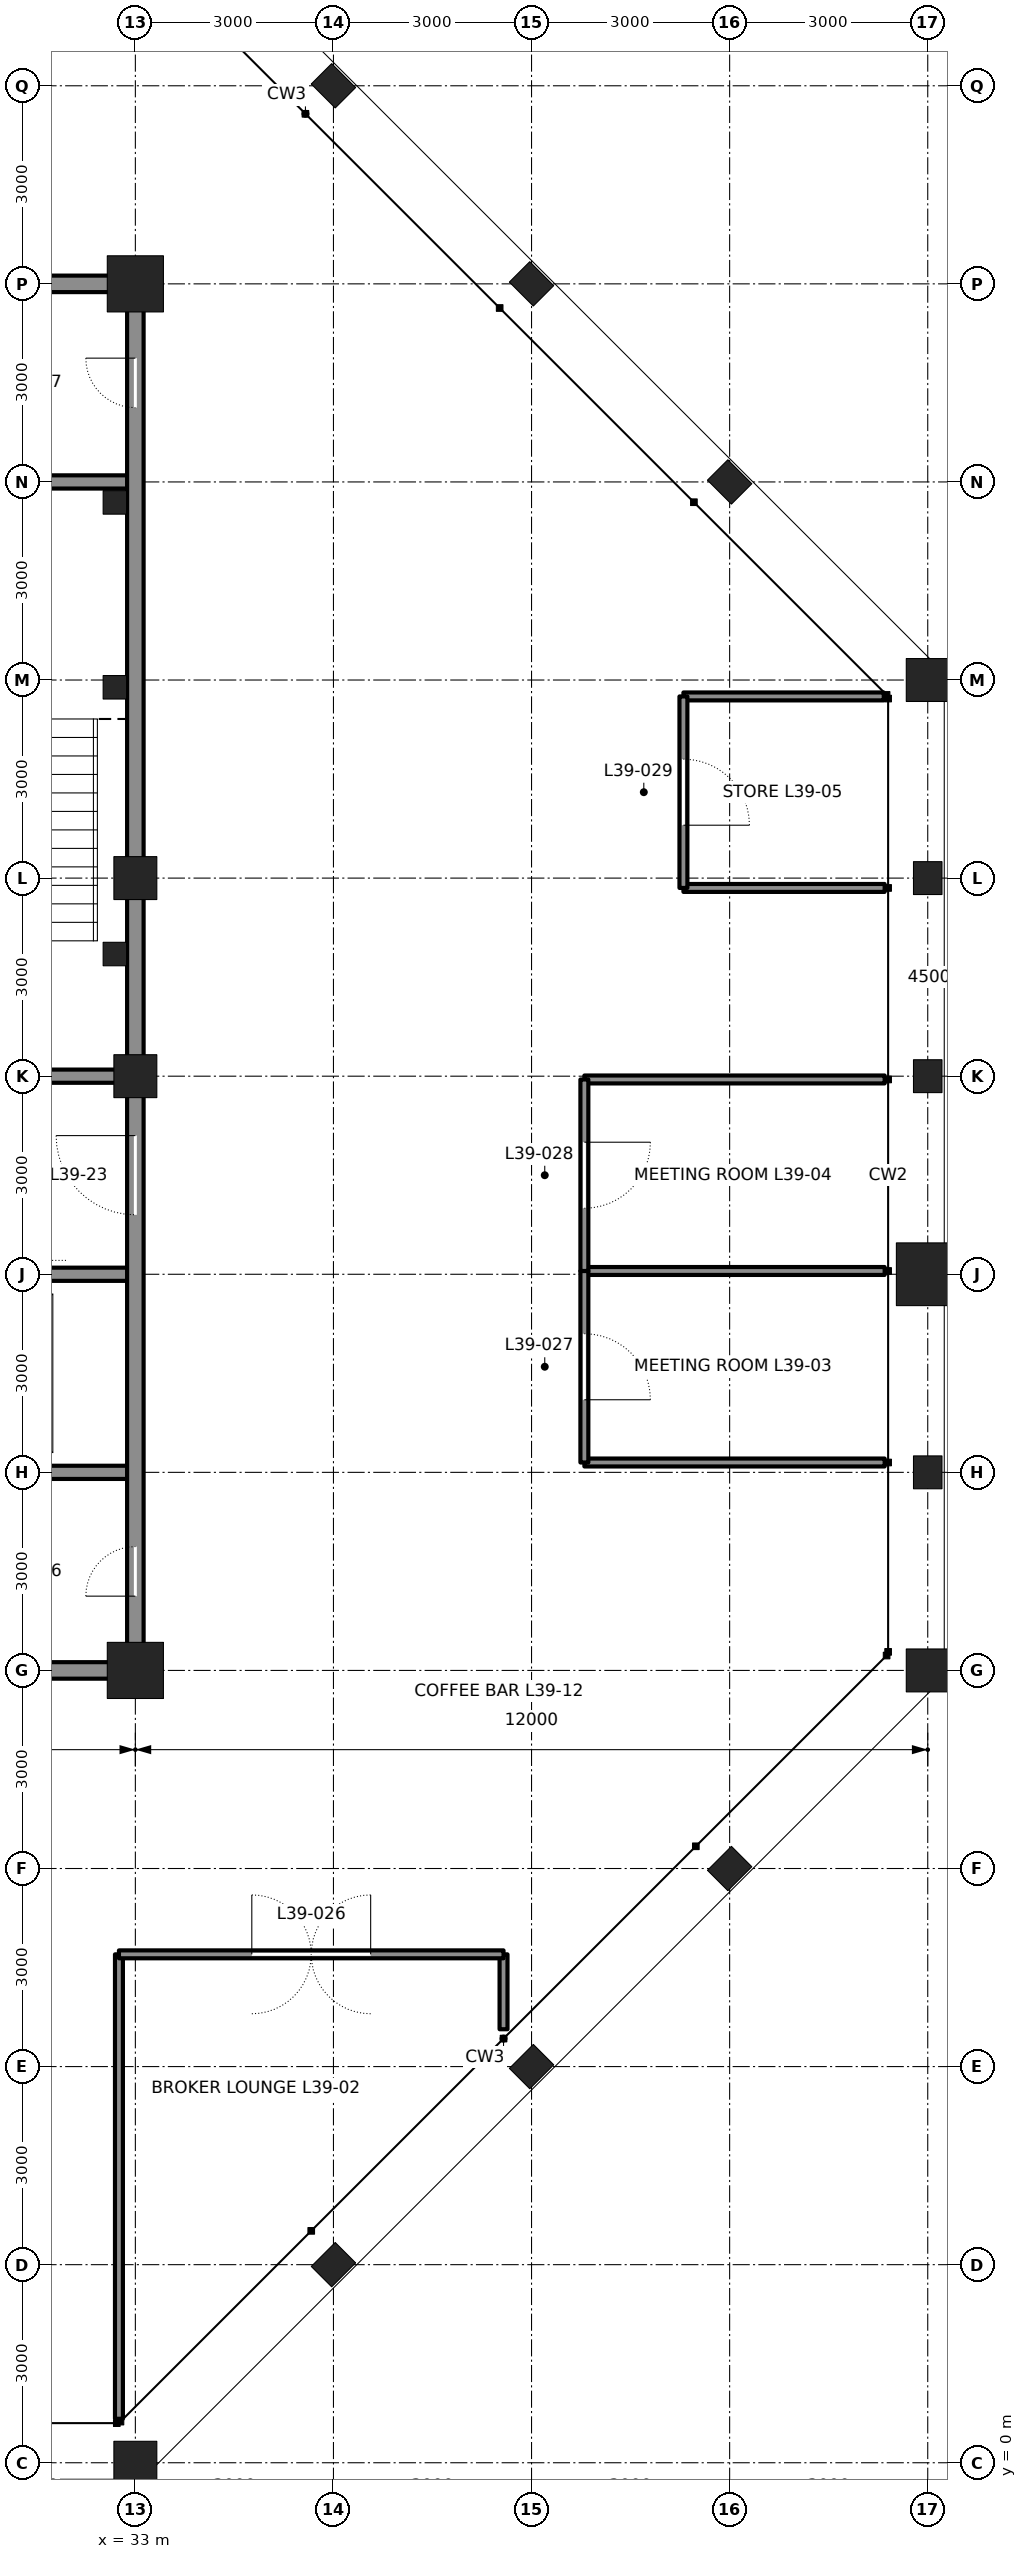
"""IFC4 building model, lengths in metres.
Left out: names, types, materials, properties, quantities, classifications, styles, units other than length and angle.
Written with IfcOpenShell. Run it as: python <this file> out.ifc"""

import sys

from ifc_helpers import new_model, si_unit, direction, frame, frame_2d, origin, origin_2d, place, context, subcontext, project, spatial, rectangle, hollow_rectangle, i_section, extrude, element, fill, save


model = new_model("IFC4")
c1 = context("Model", 3, precision=1e-05, world=origin(), true_north=direction((0.0, 1.0)))
c2 = subcontext(c1, "Body", "Model", "MODEL_VIEW")
j1 = project(units=[si_unit("LENGTHUNIT", "METRE"), si_unit("PLANEANGLEUNIT", "RADIAN")], contexts=[c1])
p1 = place(None, origin())
s1 = spatial("IfcSite", under=j1, at=p1, CompositionType="ELEMENT")
p2 = place(p1, origin())
s2 = spatial("IfcBuilding", under=s1, at=p2, CompositionType="ELEMENT")
p3 = place(p2, frame((0.0, 0.0, 180.0)))
s3 = spatial("IfcBuildingStorey", under=s2, at=p3, CompositionType="ELEMENT", Elevation=180.0)
p4 = place(p3, frame((33.0, 0.0, 0.0), z_axis=(0.0, 0.0, 1.0), x_axis=(0.0, -1.0, 0.0)))
e1 = element("IfcColumn", 1, at=p4, inside=s3, PredefinedType="COLUMN", context=c2, shape_type="SweptSolid", body=[
    extrude(hollow_rectangle(XDim=0.65, YDim=0.65, WallThickness=0.065, at=origin_2d()), origin(), (0.0, 0.0, 1.0), 4.5),
])
for number, where, z_axis, x_axis in (
    (2, (36.0, 3.0, -0.91), (0.0, 0.0, 1.0), (0.707, -0.707, 0.0)),
    (3, (39.0, 6.0, -0.91), (0.0, 0.0, 1.0), (0.707, -0.707, 0.0)),
    (4, (42.0, 9.0, -0.91), (0.0, 0.0, 1.0), (0.707, -0.707, 0.0)),
):
    element("IfcColumn", number, at=place(p3, frame(where, z_axis=z_axis, x_axis=x_axis)), inside=s3, PredefinedType="COLUMN", context=c2, shape_type="SweptSolid", body=[
        extrude(i_section(OverallWidth=0.437, OverallDepth=0.513, WebThickness=0.061, FlangeThickness=0.097, at=origin_2d()), origin(), (0.0, 0.0, 1.0), 5.41),
    ])
p5 = place(p3, frame((45.0, 12.0, 0.0), z_axis=(0.0, 0.0, 1.0), x_axis=(1.0, 0.0, 0.0)))
e5 = element("IfcColumn", 5, at=p5, inside=s3, PredefinedType="COLUMN", context=c2, shape_type="SweptSolid", body=[
    extrude(hollow_rectangle(XDim=0.65, YDim=0.65, WallThickness=0.065, at=origin_2d()), origin(), (0.0, 0.0, 1.0), 4.5),
])
p6 = place(p3, frame((45.0, 15.0, 0.0), z_axis=(0.0, 0.0, 1.0), x_axis=(1.0, 0.0, 0.0)))
e6 = element("IfcColumn", 6, at=p6, inside=s3, PredefinedType="COLUMN", context=c2, shape_type="SweptSolid", body=[
    extrude(i_section(OverallWidth=0.432, OverallDepth=0.498, WebThickness=0.056, FlangeThickness=0.089, at=origin_2d()), origin(), (0.0, 0.0, 1.0), 4.5),
])
p7 = place(p3, frame((45.0, 18.0, 0.0), z_axis=(0.0, 0.0, 1.0), x_axis=(1.0, 0.0, 0.0)))
e7 = element("IfcColumn", 7, at=p7, inside=s3, PredefinedType="COLUMN", context=c2, shape_type="SweptSolid", body=[
    extrude(hollow_rectangle(XDim=0.95, YDim=0.95, WallThickness=0.11, at=origin_2d()), origin(), (0.0, 0.0, 1.0), 4.5),
])
for number, where, z_axis, x_axis in (
    (8, (45.0, 21.0, 0.0), (0.0, 0.0, 1.0), (1.0, 0.0, 0.0)),
    (9, (45.0, 24.0, 0.0), (0.0, 0.0, 1.0), (1.0, 0.0, 0.0)),
):
    element("IfcColumn", number, at=place(p3, frame(where, z_axis=z_axis, x_axis=x_axis)), inside=s3, PredefinedType="COLUMN", context=c2, shape_type="SweptSolid", body=[
        extrude(i_section(OverallWidth=0.432, OverallDepth=0.498, WebThickness=0.056, FlangeThickness=0.089, at=origin_2d()), origin(), (0.0, 0.0, 1.0), 4.5),
    ])
p8 = place(p3, frame((45.0, 27.0, 0.0), z_axis=(0.0, 0.0, 1.0), x_axis=(1.0, 0.0, 0.0)))
e10 = element("IfcColumn", 10, at=p8, inside=s3, PredefinedType="COLUMN", context=c2, shape_type="SweptSolid", body=[
    extrude(hollow_rectangle(XDim=0.65, YDim=0.65, WallThickness=0.065, at=origin_2d()), origin(), (0.0, 0.0, 1.0), 4.5),
])
for number, where, z_axis, x_axis in (
    (11, (42.0, 30.0, 0.0), (0.0, 0.0, 1.0), (0.707, 0.707, 0.0)),
    (12, (39.0, 33.0, 0.0), (0.0, 0.0, 1.0), (0.707, 0.707, 0.0)),
    (13, (36.0, 36.0, 0.0), (0.0, 0.0, 1.0), (0.707, 0.707, 0.0)),
):
    element("IfcColumn", number, at=place(p3, frame(where, z_axis=z_axis, x_axis=x_axis)), inside=s3, PredefinedType="COLUMN", context=c2, shape_type="SweptSolid", body=[
        extrude(i_section(OverallWidth=0.437, OverallDepth=0.513, WebThickness=0.061, FlangeThickness=0.097, at=origin_2d()), origin(), (0.0, 0.0, 1.0), 4.5),
    ])
for number, where, z_axis, x_axis in (
    (14, (33.0, 12.0, 0.0), (0.0, 0.0, 1.0), (1.0, 0.0, 0.0)),
    (15, (33.0, 33.0, 0.0), (0.0, 0.0, 1.0), (1.0, 0.0, 0.0)),
):
    element("IfcColumn", number, at=place(p3, frame(where, z_axis=z_axis, x_axis=x_axis)), inside=s3, PredefinedType="COLUMN", context=c2, shape_type="SweptSolid", body=[
        extrude(hollow_rectangle(XDim=0.85, YDim=0.85, WallThickness=0.085, at=origin_2d()), origin(), (0.0, 0.0, 1.0), 4.5),
    ])
for number, where, z_axis, x_axis in (
    (16, (33.0, 21.0, 0.0), (0.0, 0.0, 1.0), (1.0, 0.0, 0.0)),
    (17, (33.0, 24.0, 0.0), (0.0, 0.0, 1.0), (1.0, 0.0, 0.0)),
):
    element("IfcColumn", number, at=place(p3, frame(where, z_axis=z_axis, x_axis=x_axis)), inside=s3, PredefinedType="COLUMN", context=c2, shape_type="SweptSolid", body=[
        extrude(hollow_rectangle(XDim=0.65, YDim=0.65, WallThickness=0.065, at=origin_2d()), origin(), (0.0, 0.0, 1.0), 4.5),
    ])
p9 = place(p3, frame((28.75, 12.0, 0.0), z_axis=(0.0, 0.0, 1.0), x_axis=(1.0, 0.0, 0.0)))
e18 = element("IfcWall", 18, at=p9, inside=s3, PredefinedType="SOLIDWALL", context=c2, shape_type="SweptSolid", body=[
    extrude(rectangle(XDim=4.0, YDim=0.25, at=frame_2d((2.0, 0.0))), origin(), (0.0, 0.0, 1.0), 3.481),
])
p10 = place(p3, frame((25.5, 15.0, 0.0), z_axis=(0.0, 0.0, 1.0), x_axis=(1.0, 0.0, 0.0)))
e19 = element("IfcWall", 19, at=p10, inside=s3, PredefinedType="SOLIDWALL", context=c2, shape_type="SweptSolid", body=[
    extrude(rectangle(XDim=7.5, YDim=0.2, at=frame_2d((3.75, 0.0))), origin(), (0.0, 0.0, 1.0), 4.34),
])
p11 = place(p3, frame((28.5, 30.0, 0.0), z_axis=(0.0, 0.0, 1.0), x_axis=(1.0, 0.0, 0.0)))
e20 = element("IfcWall", 20, at=p11, inside=s3, PredefinedType="SOLIDWALL", context=c2, shape_type="SweptSolid", body=[
    extrude(rectangle(XDim=4.5, YDim=0.2, at=frame_2d((2.25, 0.0))), origin(), (0.0, 0.0, 1.0), 4.34),
])
p12 = place(p3, frame((28.75, 33.0, 0.0), z_axis=(0.0, 0.0, 1.0), x_axis=(1.0, 0.0, 0.0)))
e21 = element("IfcWall", 21, at=p12, inside=s3, PredefinedType="SOLIDWALL", context=c2, shape_type="SweptSolid", body=[
    extrude(rectangle(XDim=4.0, YDim=0.25, at=frame_2d((2.0, 0.0))), origin(), (0.0, 0.0, 1.0), 3.481),
])
p13 = place(p3, frame((25.5, 18.0, 0.0), z_axis=(0.0, 0.0, 1.0), x_axis=(1.0, 0.0, 0.0)))
e22 = element("IfcWall", 22, at=p13, inside=s3, PredefinedType="SOLIDWALL", context=c2, shape_type="SweptSolid", body=[
    extrude(rectangle(XDim=7.5, YDim=0.2, at=frame_2d((3.75, 0.0))), origin(), (0.0, 0.0, 1.0), 4.34),
])
p14 = place(p13, frame((4.65, 0.0, 0.0)))
e23 = element("IfcOpeningElement", 23, at=p14, cuts=e22, PredefinedType="OPENING", context=c2, shape_type="SweptSolid", body=[
    extrude(rectangle(XDim=1.2, YDim=2.1, at=frame_2d((0.6, 1.05))), frame((0.0, 0.11, 0.0), z_axis=(0.0, -1.0, 0.0), x_axis=(1.0, 0.0, 0.0)), (0.0, 0.0, 1.0), 0.22),
])
p15 = place(p3, frame((28.75, 21.0, 0.0), z_axis=(0.0, 0.0, 1.0), x_axis=(1.0, 0.0, 0.0)))
e24 = element("IfcWall", 24, at=p15, inside=s3, PredefinedType="SOLIDWALL", context=c2, shape_type="SweptSolid", body=[
    extrude(rectangle(XDim=4.0, YDim=0.2, at=frame_2d((2.0, 0.0))), origin(), (0.0, 0.0, 1.0), 3.39),
])
p16 = place(p15, frame((1.4, 0.0, 0.0)))
e25 = element("IfcOpeningElement", 25, at=p16, cuts=e24, PredefinedType="OPENING", context=c2, shape_type="SweptSolid", body=[
    extrude(rectangle(XDim=1.2, YDim=2.1, at=frame_2d((0.6, 1.05))), frame((0.0, 0.11, 0.0), z_axis=(0.0, -1.0, 0.0), x_axis=(1.0, 0.0, 0.0)), (0.0, 0.0, 1.0), 0.22),
])
p17 = place(p3, frame((33.0, 12.25, 0.0), z_axis=(0.0, 0.0, 1.0), x_axis=(0.0, 1.0, 0.0)))
e26 = element("IfcWall", 26, at=p17, inside=s3, PredefinedType="SOLIDWALL", context=c2, shape_type="SweptSolid", body=[
    extrude(rectangle(XDim=8.5, YDim=0.25, at=frame_2d((4.25, 0.0))), origin(), (0.0, 0.0, 1.0), 3.413),
])
p18 = place(p17, frame((6.65, 0.0, 0.0)))
e27 = element("IfcOpeningElement", 27, at=p18, cuts=e26, PredefinedType="OPENING", context=c2, shape_type="SweptSolid", body=[
    extrude(rectangle(XDim=1.2, YDim=2.1, at=frame_2d((0.6, 1.05))), frame((0.0, 0.135, 0.0), z_axis=(0.0, -1.0, 0.0), x_axis=(1.0, 0.0, 0.0)), (0.0, 0.0, 1.0), 0.27),
])
p19 = place(p17, frame((0.875, 0.0, 0.0)))
e28 = element("IfcOpeningElement", 28, at=p19, cuts=e26, PredefinedType="OPENING", context=c2, shape_type="SweptSolid", body=[
    extrude(rectangle(XDim=0.75, YDim=2.1, at=frame_2d((0.375, 1.05))), frame((0.0, 0.135, 0.0), z_axis=(0.0, -1.0, 0.0), x_axis=(1.0, 0.0, 0.0)), (0.0, 0.0, 1.0), 0.27),
])
p20 = place(p3, frame((33.0, 21.25, 0.0), z_axis=(0.0, 0.0, 1.0), x_axis=(0.0, 1.0, 0.0)))
e29 = element("IfcWall", 29, at=p20, inside=s3, PredefinedType="SOLIDWALL", context=c2, shape_type="SweptSolid", body=[
    extrude(rectangle(XDim=2.5, YDim=0.25, at=frame_2d((1.25, 0.0))), origin(), (0.0, 0.0, 1.0), 3.413),
])
p21 = place(p3, frame((33.0, 24.25, 0.0), z_axis=(0.0, 0.0, 1.0), x_axis=(0.0, 1.0, 0.0)))
e30 = element("IfcWall", 30, at=p21, inside=s3, PredefinedType="SOLIDWALL", context=c2, shape_type="SweptSolid", body=[
    extrude(rectangle(XDim=8.5, YDim=0.25, at=frame_2d((4.25, 0.0))), origin(), (0.0, 0.0, 1.0), 3.413),
])
p22 = place(p21, frame((6.875, 0.0, 0.0)))
e31 = element("IfcOpeningElement", 31, at=p22, cuts=e30, PredefinedType="OPENING", context=c2, shape_type="SweptSolid", body=[
    extrude(rectangle(XDim=0.75, YDim=2.1, at=frame_2d((0.375, 1.05))), frame((0.0, 0.135, 0.0), z_axis=(0.0, -1.0, 0.0), x_axis=(1.0, 0.0, 0.0)), (0.0, 0.0, 1.0), 0.27),
])
p23 = place(p3, frame((32.751, 0.666, 0.0), z_axis=(0.0, 0.0, 1.0), x_axis=(0.0, 1.0, 0.0)))
e32 = element("IfcWall", 32, at=p23, inside=s3, PredefinedType="PARTITIONING", context=c2, shape_type="SweptSolid", body=[
    extrude(rectangle(XDim=7.034, YDim=0.12, at=frame_2d((3.517, 0.0))), origin(), (0.0, 0.0, 1.0), 4.34),
])
p24 = place(p3, frame((38.576, 6.566, 0.0), z_axis=(0.0, 0.0, 1.0), x_axis=(0.0, 1.0, 0.0)))
e33 = element("IfcWall", 33, at=p24, inside=s3, PredefinedType="PARTITIONING", context=c2, shape_type="SweptSolid", body=[
    extrude(rectangle(XDim=1.134, YDim=0.12, at=frame_2d((0.567, 0.0))), origin(), (0.0, 0.0, 1.0), 4.34),
])
p25 = place(p3, frame((32.751, 7.7, 0.0), z_axis=(0.0, 0.0, 1.0), x_axis=(1.0, 0.0, 0.0)))
e34 = element("IfcWall", 34, at=p25, inside=s3, PredefinedType="PARTITIONING", context=c2, shape_type="SweptSolid", body=[
    extrude(rectangle(XDim=5.824, YDim=0.12, at=frame_2d((2.912, 0.0))), origin(), (0.0, 0.0, 1.0), 4.34),
])
p26 = place(p25, frame((2.012, 0.0, 0.0)))
e35 = element("IfcOpeningElement", 35, at=p26, cuts=e34, PredefinedType="OPENING", context=c2, shape_type="SweptSolid", body=[
    extrude(rectangle(XDim=1.8, YDim=2.4, at=frame_2d((0.9, 1.2))), frame((0.0, 0.07, 0.0), z_axis=(0.0, -1.0, 0.0), x_axis=(1.0, 0.0, 0.0)), (0.0, 0.0, 1.0), 0.14),
])
p27 = place(p3, frame((44.347, 15.149, 0.0), z_axis=(0.0, 0.0, 1.0), x_axis=(-1.0, 0.0, 0.0)))
e36 = element("IfcWall", 36, at=p27, inside=s3, PredefinedType="PARTITIONING", context=c2, shape_type="SweptSolid", body=[
    extrude(rectangle(XDim=4.547, YDim=0.12, at=frame_2d((2.274, 0.0))), origin(), (0.0, 0.0, 1.0), 4.34),
])
for number, where, z_axis, x_axis in (
    (37, (44.347, 18.05, 0.0), (0.0, 0.0, 1.0), (-1.0, 0.0, 0.0)),
    (38, (44.347, 20.95, 0.0), (0.0, 0.0, 1.0), (-1.0, 0.0, 0.0)),
):
    element("IfcWall", number, at=place(p3, frame(where, z_axis=z_axis, x_axis=x_axis)), inside=s3, PredefinedType="PARTITIONING", context=c2, shape_type="SweptSolid", body=[
        extrude(rectangle(XDim=4.547, YDim=0.12, at=frame_2d((2.274, 0.0))), origin(), (0.0, 0.0, 1.0), 3.657),
    ])
p28 = place(p3, frame((44.347, 23.851, 0.0), z_axis=(0.0, 0.0, 1.0), x_axis=(-1.0, 0.0, 0.0)))
e39 = element("IfcWall", 39, at=p28, inside=s3, PredefinedType="PARTITIONING", context=c2, shape_type="SweptSolid", body=[
    extrude(rectangle(XDim=3.047, YDim=0.12, at=frame_2d((1.524, 0.0))), origin(), (0.0, 0.0, 1.0), 4.34),
])
p29 = place(p3, frame((44.334, 26.751, 0.0), z_axis=(0.0, 0.0, 1.0), x_axis=(-1.0, 0.0, 0.0)))
e40 = element("IfcWall", 40, at=p29, inside=s3, PredefinedType="PARTITIONING", context=c2, shape_type="SweptSolid", body=[
    extrude(rectangle(XDim=3.034, YDim=0.12, at=frame_2d((1.517, 0.0))), origin(), (0.0, 0.0, 1.0), 4.34),
])
p30 = place(p3, frame((39.8, 15.149, 0.0), z_axis=(0.0, 0.0, 1.0), x_axis=(0.0, 1.0, 0.0)))
e41 = element("IfcWall", 41, at=p30, inside=s3, PredefinedType="PARTITIONING", context=c2, shape_type="SweptSolid", body=[
    extrude(rectangle(XDim=2.901, YDim=0.12, at=frame_2d((1.45, 0.0))), origin(), (0.0, 0.0, 1.0), 4.34),
])
p31 = place(p30, frame((0.95, 0.0, 0.0)))
e42 = element("IfcOpeningElement", 42, at=p31, cuts=e41, PredefinedType="OPENING", context=c2, shape_type="SweptSolid", body=[
    extrude(rectangle(XDim=1.0, YDim=2.4, at=frame_2d((0.5, 1.2))), frame((0.0, 0.07, 0.0), z_axis=(0.0, -1.0, 0.0), x_axis=(1.0, 0.0, 0.0)), (0.0, 0.0, 1.0), 0.14),
])
p32 = place(p3, frame((39.8, 18.05, 0.0), z_axis=(0.0, 0.0, 1.0), x_axis=(0.0, 1.0, 0.0)))
e43 = element("IfcWall", 43, at=p32, inside=s3, PredefinedType="PARTITIONING", context=c2, shape_type="SweptSolid", body=[
    extrude(rectangle(XDim=2.9, YDim=0.12, at=frame_2d((1.45, 0.0))), origin(), (0.0, 0.0, 1.0), 4.34),
])
p33 = place(p32, frame((0.95, 0.0, 0.0)))
e44 = element("IfcOpeningElement", 44, at=p33, cuts=e43, PredefinedType="OPENING", context=c2, shape_type="SweptSolid", body=[
    extrude(rectangle(XDim=1.0, YDim=2.4, at=frame_2d((0.5, 1.2))), frame((0.0, 0.07, 0.0), z_axis=(0.0, -1.0, 0.0), x_axis=(1.0, 0.0, 0.0)), (0.0, 0.0, 1.0), 0.14),
])
p34 = place(p3, frame((41.3, 23.851, 0.0), z_axis=(0.0, 0.0, 1.0), x_axis=(0.0, 1.0, 0.0)))
e45 = element("IfcWall", 45, at=p34, inside=s3, PredefinedType="PARTITIONING", context=c2, shape_type="SweptSolid", body=[
    extrude(rectangle(XDim=2.901, YDim=0.12, at=frame_2d((1.45, 0.0))), origin(), (0.0, 0.0, 1.0), 4.34),
])
p35 = place(p34, frame((0.95, 0.0, 0.0)))
e46 = element("IfcOpeningElement", 46, at=p35, cuts=e45, PredefinedType="OPENING", context=c2, shape_type="SweptSolid", body=[
    extrude(rectangle(XDim=1.0, YDim=2.4, at=frame_2d((0.5, 1.2))), frame((0.0, 0.07, 0.0), z_axis=(0.0, -1.0, 0.0), x_axis=(1.0, 0.0, 0.0)), (0.0, 0.0, 1.0), 0.14),
])
for number, where, z_axis, x_axis in (
    (47, (32.69, 29.69, 0.0), (0.0, 0.0, 1.0), (1.0, 0.0, 0.0)),
    (48, (32.69, 26.89, 0.0), (0.0, 0.0, 1.0), (1.0, 0.0, 0.0)),
    (49, (32.69, 22.85, 0.0), (0.0, 0.0, 1.0), (1.0, 0.0, 0.0)),
):
    element("IfcColumn", number, at=place(p3, frame(where, z_axis=z_axis, x_axis=x_axis)), inside=s3, PredefinedType="COLUMN", context=c2, shape_type="SweptSolid", body=[
        extrude(hollow_rectangle(XDim=0.356, YDim=0.356, WallThickness=0.015, at=origin_2d()), origin(), (0.0, 0.0, 1.0), 4.5),
    ])
p36 = place(p18, origin())
e50 = element("IfcDoor", 50, at=p36, inside=s3, OperationType="SINGLE_SWING_RIGHT", PredefinedType="DOOR", context=c2, shape_type="SweptSolid", body=[
    extrude(rectangle(XDim=1.2, YDim=2.1, at=frame_2d((0.6, 1.05))), frame((0.0, 0.025, 0.0), z_axis=(0.0, -1.0, 0.0), x_axis=(1.0, 0.0, 0.0)), (0.0, 0.0, 1.0), 0.05),
])
fill(e27, e50)
p37 = place(p19, origin())
e51 = element("IfcDoor", 51, at=p37, inside=s3, OperationType="SINGLE_SWING_LEFT", PredefinedType="DOOR", context=c2, shape_type="SweptSolid", body=[
    extrude(rectangle(XDim=0.75, YDim=2.1, at=frame_2d((0.375, 1.05))), frame((0.0, 0.025, 0.0), z_axis=(0.0, -1.0, 0.0), x_axis=(1.0, 0.0, 0.0)), (0.0, 0.0, 1.0), 0.05),
])
fill(e28, e51)
p38 = place(p22, origin())
e52 = element("IfcDoor", 52, at=p38, inside=s3, OperationType="SINGLE_SWING_RIGHT", PredefinedType="DOOR", context=c2, shape_type="SweptSolid", body=[
    extrude(rectangle(XDim=0.75, YDim=2.1, at=frame_2d((0.375, 1.05))), frame((0.0, 0.025, 0.0), z_axis=(0.0, -1.0, 0.0), x_axis=(1.0, 0.0, 0.0)), (0.0, 0.0, 1.0), 0.05),
])
fill(e31, e52)
p39 = place(p26, origin())
e53 = element("IfcDoor", 53, at=p39, inside=s3, OperationType="DOUBLE_DOOR_DOUBLE_SWING", PredefinedType="DOOR", context=c2, shape_type="SweptSolid", body=[
    extrude(rectangle(XDim=1.8, YDim=2.4, at=frame_2d((0.9, 1.2))), frame((0.0, 0.025, 0.0), z_axis=(0.0, -1.0, 0.0), x_axis=(1.0, 0.0, 0.0)), (0.0, 0.0, 1.0), 0.05),
])
fill(e35, e53)
p40 = place(p31, frame((1.0, 0.0, 0.0), z_axis=(0.0, 0.0, 1.0), x_axis=(-1.0, 0.0, 0.0)))
e54 = element("IfcDoor", 54, at=p40, inside=s3, OperationType="SINGLE_SWING_RIGHT", PredefinedType="DOOR", context=c2, shape_type="SweptSolid", body=[
    extrude(rectangle(XDim=1.0, YDim=2.4, at=frame_2d((0.5, 1.2))), frame((0.0, 0.025, 0.0), z_axis=(0.0, -1.0, 0.0), x_axis=(1.0, 0.0, 0.0)), (0.0, 0.0, 1.0), 0.05),
])
fill(e42, e54)
p41 = place(p33, frame((1.0, 0.0, 0.0), z_axis=(0.0, 0.0, 1.0), x_axis=(-1.0, 0.0, 0.0)))
e55 = element("IfcDoor", 55, at=p41, inside=s3, OperationType="SINGLE_SWING_LEFT", PredefinedType="DOOR", context=c2, shape_type="SweptSolid", body=[
    extrude(rectangle(XDim=1.0, YDim=2.4, at=frame_2d((0.5, 1.2))), frame((0.0, 0.025, 0.0), z_axis=(0.0, -1.0, 0.0), x_axis=(1.0, 0.0, 0.0)), (0.0, 0.0, 1.0), 0.05),
])
fill(e44, e55)
p42 = place(p35, frame((1.0, 0.0, 0.0), z_axis=(0.0, 0.0, 1.0), x_axis=(-1.0, 0.0, 0.0)))
e56 = element("IfcDoor", 56, at=p42, inside=s3, OperationType="SINGLE_SWING_RIGHT", PredefinedType="DOOR", context=c2, shape_type="SweptSolid", body=[
    extrude(rectangle(XDim=1.0, YDim=2.4, at=frame_2d((0.5, 1.2))), frame((0.0, 0.025, 0.0), z_axis=(0.0, -1.0, 0.0), x_axis=(1.0, 0.0, 0.0)), (0.0, 0.0, 1.0), 0.05),
])
fill(e46, e56)
save(model, sys.argv[1])
